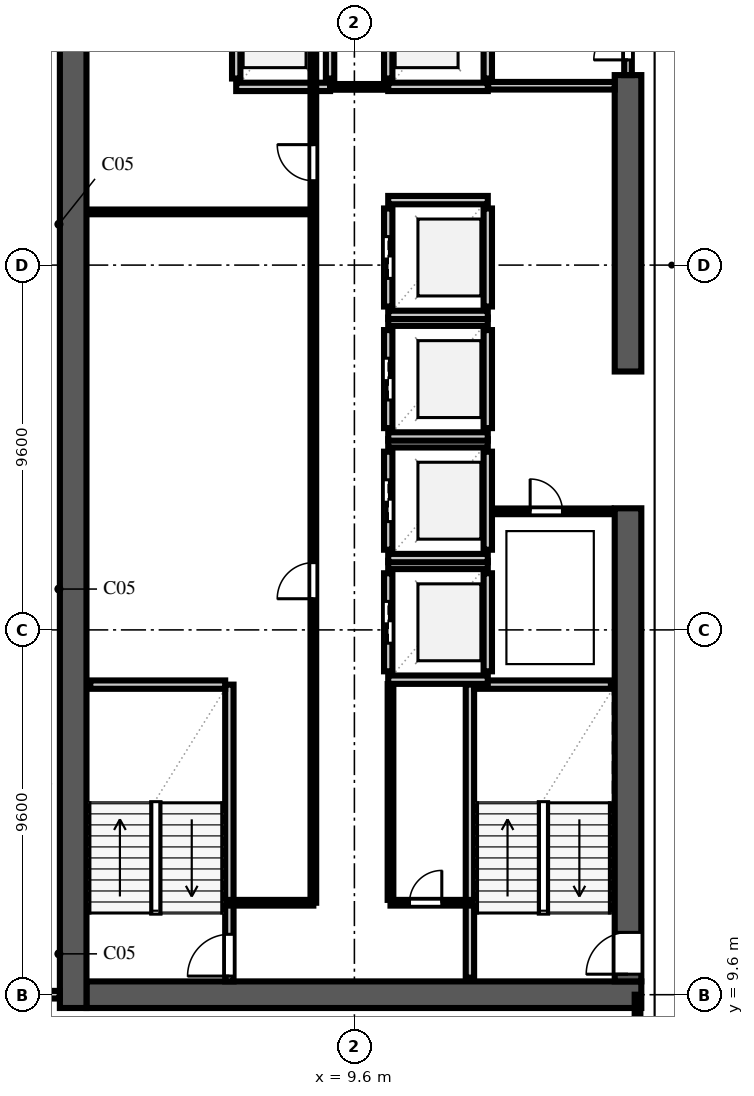
"""IFC4 building model, lengths in metres.
Left out: names, types, materials, properties, quantities, classifications, styles, units other than length and angle.
Written with IfcOpenShell. Run it as: python <this file> out.ifc"""

import sys

from ifc_helpers import new_model, si_unit, direction, frame, frame_2d, origin, place, context, subcontext, project, spatial, rectangle, extrude, element, fill, save


model = new_model("IFC4")
c1 = context("Model", 3, precision=1e-05, world=origin(), true_north=direction((0.0, 1.0)))
c2 = subcontext(c1, "Body", "Model", "MODEL_VIEW")
j1 = project(units=[si_unit("LENGTHUNIT", "METRE"), si_unit("PLANEANGLEUNIT", "RADIAN")], contexts=[c1])
p1 = place(None, origin())
s1 = spatial("IfcSite", under=j1, at=p1, CompositionType="ELEMENT")
p2 = place(p1, origin())
s2 = spatial("IfcBuilding", under=s1, at=p2, CompositionType="ELEMENT")
p3 = place(p2, frame((0.0, 0.0, 167.4)))
s3 = spatial("IfcBuildingStorey", under=s2, at=p3, CompositionType="ELEMENT", Elevation=167.4)
p4 = place(p3, frame((2.55, 9.6, 0.0), z_axis=(0.0, 0.0, 1.0), x_axis=(1.0, 0.0, 0.0)))
e1 = element("IfcWall", 1, at=p4, inside=s3, PredefinedType="SHEAR", context=c2, shape_type="SweptSolid", body=[
    extrude(rectangle(XDim=14.6, YDim=0.7, at=frame_2d((7.3, 0.0))), origin(), (0.0, 0.0, 1.0), 3.54),
])
p5 = place(p3, frame((2.2, 9.25, 0.0), z_axis=(0.0, 0.0, 1.0), x_axis=(0.0, 1.0, 0.0)))
e2 = element("IfcWall", 2, at=p5, inside=s3, PredefinedType="SHEAR", context=c2, shape_type="SweptSolid", body=[
    extrude(rectangle(XDim=39.1, YDim=0.7, at=frame_2d((19.55, 0.0))), origin(), (0.0, 0.0, 1.0), 3.54),
])
p6 = place(p3, frame((16.8, 9.95, 0.0), z_axis=(0.0, 0.0, 1.0), x_axis=(0.0, 1.0, 0.0)))
e3 = element("IfcWall", 3, at=p6, inside=s3, PredefinedType="SHEAR", context=c2, shape_type="SweptSolid", body=[
    extrude(rectangle(XDim=12.45, YDim=0.7, at=frame_2d((6.225, 0.0))), origin(), (0.0, 0.0, 1.0), 3.54),
])
p7 = place(p6, frame((0.19, 0.0, 0.0)))
e4 = element("IfcOpeningElement", 4, at=p7, cuts=e3, PredefinedType="OPENING", context=c2, shape_type="SweptSolid", body=[
    extrude(rectangle(XDim=1.1, YDim=2.2, at=frame_2d((0.55, 1.1))), frame((0.0, 0.362, 0.0), z_axis=(0.0, -1.0, 0.0), x_axis=(1.0, 0.0, 0.0)), (0.0, 0.0, 1.0), 0.724),
])
p8 = place(p3, frame((16.8, 26.0, 0.0), z_axis=(0.0, 0.0, 1.0), x_axis=(0.0, 1.0, 0.0)))
e5 = element("IfcWall", 5, at=p8, inside=s3, PredefinedType="SHEAR", context=c2, shape_type="SweptSolid", body=[
    extrude(rectangle(XDim=7.8, YDim=0.7, at=frame_2d((3.9, 0.0))), origin(), (0.0, 0.0, 1.0), 3.54),
])
p9 = place(p3, frame((6.31, 9.95, 0.0), z_axis=(0.0, 0.0, 1.0), x_axis=(0.0, 1.0, 0.0)))
e6 = element("IfcWall", 6, at=p9, inside=s3, PredefinedType="SOLIDWALL", context=c2, shape_type="SweptSolid", body=[
    extrude(rectangle(XDim=7.81, YDim=0.22, at=frame_2d((3.905, 0.0))), origin(), (0.0, 0.0, 1.0), 3.54),
])
p10 = place(p9, frame((0.14, 0.0, 0.0)))
e7 = element("IfcOpeningElement", 7, at=p10, cuts=e6, PredefinedType="OPENING", context=c2, shape_type="SweptSolid", body=[
    extrude(rectangle(XDim=1.1, YDim=2.2, at=frame_2d((0.55, 1.1))), frame((0.0, 0.122, 0.0), z_axis=(0.0, -1.0, 0.0), x_axis=(1.0, 0.0, 0.0)), (0.0, 0.0, 1.0), 0.244),
])
p11 = place(p3, frame((2.65, 17.76, 0.0), z_axis=(0.0, 0.0, 1.0), x_axis=(1.0, 0.0, 0.0)))
e8 = element("IfcWall", 8, at=p11, inside=s3, PredefinedType="SOLIDWALL", context=c2, shape_type="SweptSolid", body=[
    extrude(rectangle(XDim=3.55, YDim=0.22, at=frame_2d((1.775, 0.0))), origin(), (0.0, 0.0, 1.0), 3.54),
])
p12 = place(p3, frame((12.64, 10.05, 0.0), z_axis=(0.0, 0.0, 1.0), x_axis=(0.0, 1.0, 0.0)))
e9 = element("IfcWall", 9, at=p12, inside=s3, PredefinedType="SOLIDWALL", context=c2, shape_type="SweptSolid", body=[
    extrude(rectangle(XDim=7.71, YDim=0.22, at=frame_2d((3.855, 0.0))), origin(), (0.0, 0.0, 1.0), 3.54),
])
p13 = place(p3, frame((12.75, 17.76, 0.0), z_axis=(0.0, 0.0, 1.0), x_axis=(1.0, 0.0, 0.0)))
e10 = element("IfcWall", 10, at=p13, inside=s3, PredefinedType="SOLIDWALL", context=c2, shape_type="SweptSolid", body=[
    extrude(rectangle(XDim=3.6, YDim=0.22, at=frame_2d((1.8, 0.0))), origin(), (0.0, 0.0, 1.0), 3.54),
])
p14 = place(p3, frame((10.49, 18.11, 0.0), z_axis=(0.0, 0.0, 1.0), x_axis=(0.0, 1.0, 0.0)))
e11 = element("IfcWall", 11, at=p14, inside=s3, PredefinedType="SOLIDWALL", context=c2, shape_type="SweptSolid", body=[
    extrude(rectangle(XDim=2.58, YDim=0.22, at=frame_2d((1.29, 0.0))), origin(), (0.0, 0.0, 1.0), 3.54),
])
p15 = place(p14, frame((0.74, 0.0, 0.0)))
e12 = element("IfcOpeningElement", 12, at=p15, cuts=e11, PredefinedType="OPENING", context=c2, shape_type="SweptSolid", body=[
    extrude(rectangle(XDim=1.1, YDim=2.2, at=frame_2d((0.55, 1.1))), frame((0.0, 0.122, 0.0), z_axis=(0.0, -1.0, 0.0), x_axis=(1.0, 0.0, 0.0)), (0.0, 0.0, 1.0), 0.244),
])
p16 = place(p3, frame((13.11, 18.11, 0.0), z_axis=(0.0, 0.0, 1.0), x_axis=(0.0, 1.0, 0.0)))
e13 = element("IfcWall", 13, at=p16, inside=s3, PredefinedType="SOLIDWALL", context=c2, shape_type="SweptSolid", body=[
    extrude(rectangle(XDim=2.58, YDim=0.22, at=frame_2d((1.29, 0.0))), origin(), (0.0, 0.0, 1.0), 3.54),
])
for number, where, z_axis, x_axis in (
    (14, (10.49, 17.89, 0.0), (0.0, 0.0, 1.0), (1.0, 0.0, 0.0)),
    (15, (10.49, 20.91, 0.0), (0.0, 0.0, 1.0), (1.0, 0.0, 0.0)),
):
    element("IfcWall", number, at=place(p3, frame(where, z_axis=z_axis, x_axis=x_axis)), inside=s3, PredefinedType="SOLIDWALL", context=c2, shape_type="SweptSolid", body=[
        extrude(rectangle(XDim=2.62, YDim=0.22, at=frame_2d((1.31, 0.0))), origin(), (0.0, 0.0, 1.0), 3.54),
    ])
p17 = place(p3, frame((10.49, 21.31, 0.0), z_axis=(0.0, 0.0, 1.0), x_axis=(0.0, 1.0, 0.0)))
e16 = element("IfcWall", 16, at=p17, inside=s3, PredefinedType="SOLIDWALL", context=c2, shape_type="SweptSolid", body=[
    extrude(rectangle(XDim=2.58, YDim=0.22, at=frame_2d((1.29, 0.0))), origin(), (0.0, 0.0, 1.0), 3.54),
])
p18 = place(p17, frame((0.74, 0.0, 0.0)))
e17 = element("IfcOpeningElement", 17, at=p18, cuts=e16, PredefinedType="OPENING", context=c2, shape_type="SweptSolid", body=[
    extrude(rectangle(XDim=1.1, YDim=2.2, at=frame_2d((0.55, 1.1))), frame((0.0, 0.122, 0.0), z_axis=(0.0, -1.0, 0.0), x_axis=(1.0, 0.0, 0.0)), (0.0, 0.0, 1.0), 0.244),
])
p19 = place(p3, frame((13.11, 21.31, 0.0), z_axis=(0.0, 0.0, 1.0), x_axis=(0.0, 1.0, 0.0)))
e18 = element("IfcWall", 18, at=p19, inside=s3, PredefinedType="SOLIDWALL", context=c2, shape_type="SweptSolid", body=[
    extrude(rectangle(XDim=2.58, YDim=0.22, at=frame_2d((1.29, 0.0))), origin(), (0.0, 0.0, 1.0), 3.54),
])
for number, where, z_axis, x_axis in (
    (19, (10.49, 21.09, 0.0), (0.0, 0.0, 1.0), (1.0, 0.0, 0.0)),
    (20, (10.49, 24.11, 0.0), (0.0, 0.0, 1.0), (1.0, 0.0, 0.0)),
):
    element("IfcWall", number, at=place(p3, frame(where, z_axis=z_axis, x_axis=x_axis)), inside=s3, PredefinedType="SOLIDWALL", context=c2, shape_type="SweptSolid", body=[
        extrude(rectangle(XDim=2.62, YDim=0.22, at=frame_2d((1.31, 0.0))), origin(), (0.0, 0.0, 1.0), 3.54),
    ])
p20 = place(p3, frame((10.49, 24.51, 0.0), z_axis=(0.0, 0.0, 1.0), x_axis=(0.0, 1.0, 0.0)))
e21 = element("IfcWall", 21, at=p20, inside=s3, PredefinedType="SOLIDWALL", context=c2, shape_type="SweptSolid", body=[
    extrude(rectangle(XDim=2.58, YDim=0.22, at=frame_2d((1.29, 0.0))), origin(), (0.0, 0.0, 1.0), 3.54),
])
p21 = place(p20, frame((0.74, 0.0, 0.0)))
e22 = element("IfcOpeningElement", 22, at=p21, cuts=e21, PredefinedType="OPENING", context=c2, shape_type="SweptSolid", body=[
    extrude(rectangle(XDim=1.1, YDim=2.2, at=frame_2d((0.55, 1.1))), frame((0.0, 0.122, 0.0), z_axis=(0.0, -1.0, 0.0), x_axis=(1.0, 0.0, 0.0)), (0.0, 0.0, 1.0), 0.244),
])
p22 = place(p3, frame((13.11, 24.51, 0.0), z_axis=(0.0, 0.0, 1.0), x_axis=(0.0, 1.0, 0.0)))
e23 = element("IfcWall", 23, at=p22, inside=s3, PredefinedType="SOLIDWALL", context=c2, shape_type="SweptSolid", body=[
    extrude(rectangle(XDim=2.58, YDim=0.22, at=frame_2d((1.29, 0.0))), origin(), (0.0, 0.0, 1.0), 3.54),
])
for number, where, z_axis, x_axis in (
    (24, (10.49, 24.29, 0.0), (0.0, 0.0, 1.0), (1.0, 0.0, 0.0)),
    (25, (10.49, 27.31, 0.0), (0.0, 0.0, 1.0), (1.0, 0.0, 0.0)),
):
    element("IfcWall", number, at=place(p3, frame(where, z_axis=z_axis, x_axis=x_axis)), inside=s3, PredefinedType="SOLIDWALL", context=c2, shape_type="SweptSolid", body=[
        extrude(rectangle(XDim=2.62, YDim=0.22, at=frame_2d((1.31, 0.0))), origin(), (0.0, 0.0, 1.0), 3.54),
    ])
p23 = place(p3, frame((10.49, 27.71, 0.0), z_axis=(0.0, 0.0, 1.0), x_axis=(0.0, 1.0, 0.0)))
e26 = element("IfcWall", 26, at=p23, inside=s3, PredefinedType="SOLIDWALL", context=c2, shape_type="SweptSolid", body=[
    extrude(rectangle(XDim=2.58, YDim=0.22, at=frame_2d((1.29, 0.0))), origin(), (0.0, 0.0, 1.0), 3.54),
])
p24 = place(p23, frame((0.74, 0.0, 0.0)))
e27 = element("IfcOpeningElement", 27, at=p24, cuts=e26, PredefinedType="OPENING", context=c2, shape_type="SweptSolid", body=[
    extrude(rectangle(XDim=1.1, YDim=2.2, at=frame_2d((0.55, 1.1))), frame((0.0, 0.122, 0.0), z_axis=(0.0, -1.0, 0.0), x_axis=(1.0, 0.0, 0.0)), (0.0, 0.0, 1.0), 0.244),
])
p25 = place(p3, frame((13.11, 27.71, 0.0), z_axis=(0.0, 0.0, 1.0), x_axis=(0.0, 1.0, 0.0)))
e28 = element("IfcWall", 28, at=p25, inside=s3, PredefinedType="SOLIDWALL", context=c2, shape_type="SweptSolid", body=[
    extrude(rectangle(XDim=2.58, YDim=0.22, at=frame_2d((1.29, 0.0))), origin(), (0.0, 0.0, 1.0), 3.54),
])
for number, where, z_axis, x_axis in (
    (29, (10.49, 27.49, 0.0), (0.0, 0.0, 1.0), (1.0, 0.0, 0.0)),
    (30, (10.49, 30.51, 0.0), (0.0, 0.0, 1.0), (1.0, 0.0, 0.0)),
):
    element("IfcWall", number, at=place(p3, frame(where, z_axis=z_axis, x_axis=x_axis)), inside=s3, PredefinedType="SOLIDWALL", context=c2, shape_type="SweptSolid", body=[
        extrude(rectangle(XDim=2.62, YDim=0.22, at=frame_2d((1.31, 0.0))), origin(), (0.0, 0.0, 1.0), 3.54),
    ])
for number, where, z_axis, x_axis in (
    (31, (6.49, 33.71, 0.0), (0.0, 0.0, 1.0), (0.0, 1.0, 0.0)),
    (32, (8.96, 33.71, 0.0), (0.0, 0.0, 1.0), (0.0, 1.0, 0.0)),
):
    element("IfcWall", number, at=place(p3, frame(where, z_axis=z_axis, x_axis=x_axis)), inside=s3, PredefinedType="SOLIDWALL", context=c2, shape_type="SweptSolid", body=[
        extrude(rectangle(XDim=2.78, YDim=0.22, at=frame_2d((1.39, 0.0))), origin(), (0.0, 0.0, 1.0), 3.54),
    ])
p26 = place(p3, frame((6.49, 33.49, 0.0), z_axis=(0.0, 0.0, 1.0), x_axis=(1.0, 0.0, 0.0)))
e33 = element("IfcWall", 33, at=p26, inside=s3, PredefinedType="SOLIDWALL", context=c2, shape_type="SweptSolid", body=[
    extrude(rectangle(XDim=2.47, YDim=0.22, at=frame_2d((1.235, 0.0))), origin(), (0.0, 0.0, 1.0), 3.54),
])
for number, where, z_axis, x_axis in (
    (34, (10.49, 33.71, 0.0), (0.0, 0.0, 1.0), (0.0, 1.0, 0.0)),
    (35, (13.11, 33.71, 0.0), (0.0, 0.0, 1.0), (0.0, 1.0, 0.0)),
):
    element("IfcWall", number, at=place(p3, frame(where, z_axis=z_axis, x_axis=x_axis)), inside=s3, PredefinedType="SOLIDWALL", context=c2, shape_type="SweptSolid", body=[
        extrude(rectangle(XDim=2.78, YDim=0.22, at=frame_2d((1.39, 0.0))), origin(), (0.0, 0.0, 1.0), 3.54),
    ])
p27 = place(p3, frame((10.49, 33.49, 0.0), z_axis=(0.0, 0.0, 1.0), x_axis=(1.0, 0.0, 0.0)))
e36 = element("IfcWall", 36, at=p27, inside=s3, PredefinedType="SOLIDWALL", context=c2, shape_type="SweptSolid", body=[
    extrude(rectangle(XDim=2.62, YDim=0.22, at=frame_2d((1.31, 0.0))), origin(), (0.0, 0.0, 1.0), 3.54),
])
p28 = place(p3, frame((13.12, 33.52, 0.0), z_axis=(0.0, 0.0, 1.0), x_axis=(1.0, 0.0, 0.0)))
e37 = element("IfcWall", 37, at=p28, inside=s3, PredefinedType="SOLIDWALL", context=c2, shape_type="SweptSolid", body=[
    extrude(rectangle(XDim=3.33, YDim=0.2, at=frame_2d((1.665, 0.0))), origin(), (0.0, 0.0, 1.0), 3.54),
])
p29 = place(p3, frame((16.8, 33.8, 0.0), z_axis=(0.0, 0.0, 1.0), x_axis=(0.0, 1.0, 0.0)))
e38 = element("IfcWall", 38, at=p29, inside=s3, PredefinedType="SOLIDWALL", context=c2, shape_type="SweptSolid", body=[
    extrude(rectangle(XDim=2.6, YDim=0.2, at=frame_2d((1.3, 0.0))), origin(), (0.0, 0.0, 1.0), 3.54),
])
p30 = place(p29, frame((0.4, 0.0, 0.0)))
e39 = element("IfcOpeningElement", 39, at=p30, cuts=e38, PredefinedType="OPENING", context=c2, shape_type="SweptSolid", body=[
    extrude(rectangle(XDim=1.8, YDim=2.2, at=frame_2d((0.9, 1.1))), frame((0.0, 0.112, 0.0), z_axis=(0.0, -1.0, 0.0), x_axis=(1.0, 0.0, 0.0)), (0.0, 0.0, 1.0), 0.224),
])
p31 = place(p3, frame((8.965, 33.49, 0.0), z_axis=(0.0, 0.0, 1.0), x_axis=(1.0, 0.0, 0.0)))
e40 = element("IfcWall", 40, at=p31, inside=s3, PredefinedType="PARTITIONING", context=c2, shape_type="SweptSolid", body=[
    extrude(rectangle(XDim=1.52, YDim=0.15, at=frame_2d((0.76, 0.0))), origin(), (0.0, 0.0, 1.0), 3.54),
])
p32 = place(p3, frame((10.55, 12.02, 0.0), z_axis=(0.0, 0.0, 1.0), x_axis=(1.0, 0.0, 0.0)))
e41 = element("IfcWall", 41, at=p32, inside=s3, PredefinedType="PARTITIONING", context=c2, shape_type="SweptSolid", body=[
    extrude(rectangle(XDim=2.08, YDim=0.15, at=frame_2d((1.04, 0.0))), origin(), (0.0, 0.0, 1.0), 3.54),
])
p33 = place(p32, frame((0.5, 0.0, 0.0)))
e42 = element("IfcOpeningElement", 42, at=p33, cuts=e41, PredefinedType="OPENING", context=c2, shape_type="SweptSolid", body=[
    extrude(rectangle(XDim=0.85, YDim=2.1, at=frame_2d((0.425, 1.05))), frame((0.0, 0.087, 0.0), z_axis=(0.0, -1.0, 0.0), x_axis=(1.0, 0.0, 0.0)), (0.0, 0.0, 1.0), 0.174),
])
p34 = place(p3, frame((10.55, 12.095, 0.0), z_axis=(0.0, 0.0, 1.0), x_axis=(0.0, 1.0, 0.0)))
e43 = element("IfcWall", 43, at=p34, inside=s3, PredefinedType="PARTITIONING", context=c2, shape_type="SweptSolid", body=[
    extrude(rectangle(XDim=5.68, YDim=0.15, at=frame_2d((2.84, 0.0))), origin(), (0.0, 0.0, 1.0), 3.54),
])
p35 = place(p3, frame((13.225, 22.32, 0.0), z_axis=(0.0, 0.0, 1.0), x_axis=(1.0, 0.0, 0.0)))
e44 = element("IfcWall", 44, at=p35, inside=s3, PredefinedType="PARTITIONING", context=c2, shape_type="SweptSolid", body=[
    extrude(rectangle(XDim=3.12, YDim=0.15, at=frame_2d((1.56, 0.0))), origin(), (0.0, 0.0, 1.0), 3.54),
])
p36 = place(p35, frame((1.0, 0.0, 0.0)))
e45 = element("IfcOpeningElement", 45, at=p36, cuts=e44, PredefinedType="OPENING", context=c2, shape_type="SweptSolid", body=[
    extrude(rectangle(XDim=0.85, YDim=2.1, at=frame_2d((0.425, 1.05))), frame((0.0, 0.087, 0.0), z_axis=(0.0, -1.0, 0.0), x_axis=(1.0, 0.0, 0.0)), (0.0, 0.0, 1.0), 0.174),
])
p37 = place(p3, frame((6.32, 12.02, 0.0), z_axis=(0.0, 0.0, 1.0), x_axis=(1.0, 0.0, 0.0)))
e46 = element("IfcWall", 46, at=p37, inside=s3, PredefinedType="PARTITIONING", context=c2, shape_type="SweptSolid", body=[
    extrude(rectangle(XDim=2.2, YDim=0.15, at=frame_2d((1.1, 0.0))), origin(), (0.0, 0.0, 1.0), 3.54),
])
p38 = place(p3, frame((2.65, 30.2, 0.0), z_axis=(0.0, 0.0, 1.0), x_axis=(1.0, 0.0, 0.0)))
e47 = element("IfcWall", 47, at=p38, inside=s3, PredefinedType="PARTITIONING", context=c2, shape_type="SweptSolid", body=[
    extrude(rectangle(XDim=5.87, YDim=0.125, at=frame_2d((2.935, 0.0))), origin(), (0.0, 0.0, 1.0), 3.54),
])
p39 = place(p3, frame((8.52, 12.02, 0.0), z_axis=(0.0, 0.0, 1.0), x_axis=(0.0, 1.0, 0.0)))
e48 = element("IfcWall", 48, at=p39, inside=s3, PredefinedType="PARTITIONING", context=c2, shape_type="SweptSolid", body=[
    extrude(rectangle(XDim=24.76, YDim=0.15, at=frame_2d((12.38, 0.0))), origin(), (0.0, 0.0, 1.0), 3.54),
])
p40 = place(p39, frame((8.0, 0.0, 0.0)))
e49 = element("IfcOpeningElement", 49, at=p40, cuts=e48, PredefinedType="OPENING", context=c2, shape_type="SweptSolid", body=[
    extrude(rectangle(XDim=0.95, YDim=2.15, at=frame_2d((0.475, 1.075))), frame((0.0, 0.087, 0.0), z_axis=(0.0, -1.0, 0.0), x_axis=(1.0, 0.0, 0.0)), (0.0, 0.0, 1.0), 0.174),
])
p41 = place(p39, frame((19.0, 0.0, 0.0)))
e50 = element("IfcOpeningElement", 50, at=p41, cuts=e48, PredefinedType="OPENING", context=c2, shape_type="SweptSolid", body=[
    extrude(rectangle(XDim=0.95, YDim=2.15, at=frame_2d((0.475, 1.075))), frame((0.0, 0.087, 0.0), z_axis=(0.0, -1.0, 0.0), x_axis=(1.0, 0.0, 0.0)), (0.0, 0.0, 1.0), 0.174),
])
p42 = place(p3, frame((0.85, 9.6, 0.0), z_axis=(0.0, 0.0, 1.0), x_axis=(1.0, 0.0, 0.0)))
e51 = element("IfcWall", 51, at=p42, inside=s3, PredefinedType="SOLIDWALL", context=c2, shape_type="SweptSolid", body=[
    extrude(rectangle(XDim=0.995, YDim=0.2, at=frame_2d((0.498, 0.0))), origin(), (0.0, 0.0, 1.0), 2.845),
])
p43 = place(p3, frame((17.05, 0.22, 0.0), z_axis=(0.0, 0.0, 1.0), x_axis=(0.0, 1.0, 0.0)))
e52 = element("IfcWall", 52, at=p43, inside=s3, PredefinedType="PARTITIONING", context=c2, shape_type="SweptSolid", body=[
    extrude(rectangle(XDim=9.38, YDim=0.15, at=frame_2d((4.69, 0.0))), origin(), (0.0, 0.0, 1.0), 3.54),
])
p44 = place(p43, frame((5.58, 0.0, 0.0)))
e53 = element("IfcOpeningElement", 53, at=p44, cuts=e52, PredefinedType="OPENING", context=c2, shape_type="SweptSolid", body=[
    extrude(rectangle(XDim=0.95, YDim=2.15, at=frame_2d((0.475, 1.075))), frame((0.0, 0.087, 0.0), z_axis=(0.0, -1.0, 0.0), x_axis=(1.0, 0.0, 0.0)), (0.0, 0.0, 1.0), 0.174),
])
p45 = place(p10, origin())
e54 = element("IfcDoor", 54, at=p45, inside=s3, OperationType="SINGLE_SWING_LEFT", PredefinedType="DOOR", context=c2, shape_type="SweptSolid", body=[
    extrude(rectangle(XDim=1.1, YDim=2.2, at=frame_2d((0.55, 1.1))), frame((0.0, 0.025, 0.0), z_axis=(0.0, -1.0, 0.0), x_axis=(1.0, 0.0, 0.0)), (0.0, 0.0, 1.0), 0.05),
])
fill(e7, e54)
p46 = place(p7, origin())
e55 = element("IfcDoor", 55, at=p46, inside=s3, OperationType="SINGLE_SWING_LEFT", PredefinedType="DOOR", context=c2, shape_type="SweptSolid", body=[
    extrude(rectangle(XDim=1.1, YDim=2.2, at=frame_2d((0.55, 1.1))), frame((0.0, 0.025, 0.0), z_axis=(0.0, -1.0, 0.0), x_axis=(1.0, 0.0, 0.0)), (0.0, 0.0, 1.0), 0.05),
])
fill(e4, e55)
p47 = place(p15, origin())
e56 = element("IfcDoor", 56, at=p47, inside=s3, OperationType="DOUBLE_DOOR_SLIDING", PredefinedType="DOOR", context=c2, shape_type="SweptSolid", body=[
    extrude(rectangle(XDim=1.1, YDim=2.2, at=frame_2d((0.55, 1.1))), frame((0.0, 0.025, 0.0), z_axis=(0.0, -1.0, 0.0), x_axis=(1.0, 0.0, 0.0)), (0.0, 0.0, 1.0), 0.05),
])
fill(e12, e56)
p48 = place(p18, origin())
e57 = element("IfcDoor", 57, at=p48, inside=s3, OperationType="DOUBLE_DOOR_SLIDING", PredefinedType="DOOR", context=c2, shape_type="SweptSolid", body=[
    extrude(rectangle(XDim=1.1, YDim=2.2, at=frame_2d((0.55, 1.1))), frame((0.0, 0.025, 0.0), z_axis=(0.0, -1.0, 0.0), x_axis=(1.0, 0.0, 0.0)), (0.0, 0.0, 1.0), 0.05),
])
fill(e17, e57)
p49 = place(p21, origin())
e58 = element("IfcDoor", 58, at=p49, inside=s3, OperationType="DOUBLE_DOOR_SLIDING", PredefinedType="DOOR", context=c2, shape_type="SweptSolid", body=[
    extrude(rectangle(XDim=1.1, YDim=2.2, at=frame_2d((0.55, 1.1))), frame((0.0, 0.025, 0.0), z_axis=(0.0, -1.0, 0.0), x_axis=(1.0, 0.0, 0.0)), (0.0, 0.0, 1.0), 0.05),
])
fill(e22, e58)
p50 = place(p24, origin())
e59 = element("IfcDoor", 59, at=p50, inside=s3, OperationType="DOUBLE_DOOR_SLIDING", PredefinedType="DOOR", context=c2, shape_type="SweptSolid", body=[
    extrude(rectangle(XDim=1.1, YDim=2.2, at=frame_2d((0.55, 1.1))), frame((0.0, 0.025, 0.0), z_axis=(0.0, -1.0, 0.0), x_axis=(1.0, 0.0, 0.0)), (0.0, 0.0, 1.0), 0.05),
])
fill(e27, e59)
p51 = place(p30, origin())
e60 = element("IfcDoor", 60, at=p51, inside=s3, OperationType="DOUBLE_DOOR_SINGLE_SWING", PredefinedType="DOOR", context=c2, shape_type="SweptSolid", body=[
    extrude(rectangle(XDim=1.8, YDim=2.2, at=frame_2d((0.9, 1.1))), frame((0.0, 0.025, 0.0), z_axis=(0.0, -1.0, 0.0), x_axis=(1.0, 0.0, 0.0)), (0.0, 0.0, 1.0), 0.05),
])
fill(e39, e60)
p52 = place(p33, origin())
e61 = element("IfcDoor", 61, at=p52, inside=s3, OperationType="SINGLE_SWING_RIGHT", PredefinedType="DOOR", context=c2, shape_type="SweptSolid", body=[
    extrude(rectangle(XDim=0.85, YDim=2.1, at=frame_2d((0.425, 1.05))), frame((0.0, 0.025, 0.0), z_axis=(0.0, -1.0, 0.0), x_axis=(1.0, 0.0, 0.0)), (0.0, 0.0, 1.0), 0.05),
])
fill(e42, e61)
p53 = place(p36, origin())
e62 = element("IfcDoor", 62, at=p53, inside=s3, OperationType="SINGLE_SWING_LEFT", PredefinedType="DOOR", context=c2, shape_type="SweptSolid", body=[
    extrude(rectangle(XDim=0.85, YDim=2.1, at=frame_2d((0.425, 1.05))), frame((0.0, 0.025, 0.0), z_axis=(0.0, -1.0, 0.0), x_axis=(1.0, 0.0, 0.0)), (0.0, 0.0, 1.0), 0.05),
])
fill(e45, e62)
p54 = place(p40, origin())
e63 = element("IfcDoor", 63, at=p54, inside=s3, OperationType="SINGLE_SWING_LEFT", PredefinedType="DOOR", context=c2, shape_type="SweptSolid", body=[
    extrude(rectangle(XDim=0.95, YDim=2.15, at=frame_2d((0.475, 1.075))), frame((0.0, 0.025, 0.0), z_axis=(0.0, -1.0, 0.0), x_axis=(1.0, 0.0, 0.0)), (0.0, 0.0, 1.0), 0.05),
])
fill(e49, e63)
p55 = place(p41, origin())
e64 = element("IfcDoor", 64, at=p55, inside=s3, OperationType="SINGLE_SWING_RIGHT", PredefinedType="DOOR", context=c2, shape_type="SweptSolid", body=[
    extrude(rectangle(XDim=0.95, YDim=2.15, at=frame_2d((0.475, 1.075))), frame((0.0, 0.025, 0.0), z_axis=(0.0, -1.0, 0.0), x_axis=(1.0, 0.0, 0.0)), (0.0, 0.0, 1.0), 0.05),
])
fill(e50, e64)
save(model, sys.argv[1])
